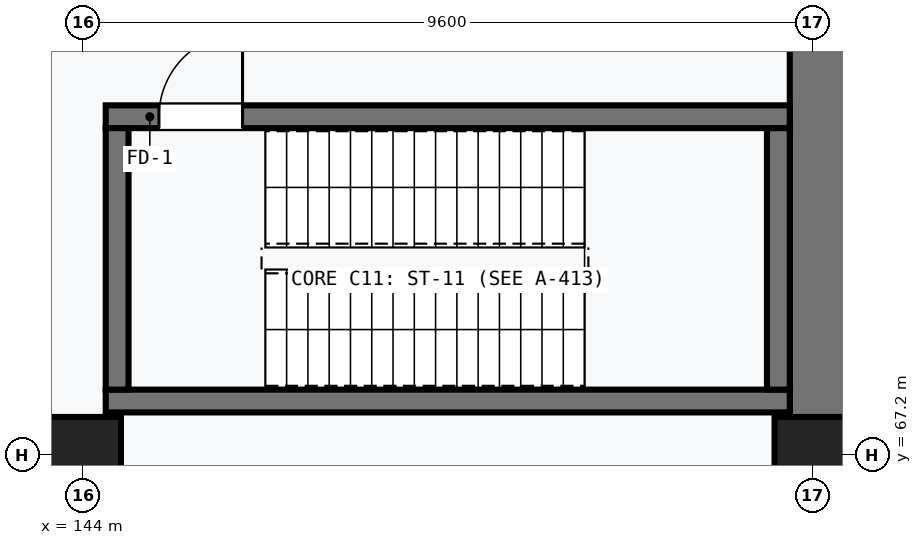
"""IFC4 building model, lengths in metres.
Left out: names, types, materials, properties, quantities, classifications, styles, units other than length and angle.
Written with IfcOpenShell. Run it as: python <this file> out.ifc"""

import sys

from ifc_helpers import new_model, si_unit, direction, frame, frame_2d, origin, origin_2d, place, context, subcontext, project, spatial, rectangle, extrude, element, fill, save


model = new_model("IFC4")
c1 = context("Model", 3, precision=1e-05, world=origin(), true_north=direction((0.0, 1.0)))
c2 = subcontext(c1, "Body", "Model", "MODEL_VIEW")
j1 = project(units=[si_unit("LENGTHUNIT", "METRE"), si_unit("PLANEANGLEUNIT", "RADIAN")], contexts=[c1])
p1 = place(None, origin())
s1 = spatial("IfcSite", under=j1, at=p1, CompositionType="ELEMENT")
p2 = place(p1, origin())
s2 = spatial("IfcBuilding", under=s1, at=p2, CompositionType="ELEMENT")
p3 = place(p2, frame((0.0, 0.0, -10.8)))
s3 = spatial("IfcBuildingStorey", under=s2, at=p3, CompositionType="ELEMENT", Elevation=-10.8)
p4 = place(p3, frame((153.7, 76.9, 0.0), z_axis=(0.0, 0.0, 1.0), x_axis=(0.0, -1.0, 0.0)))
e1 = element("IfcWall", 1, at=p4, inside=s3, PredefinedType="SOLIDWALL", context=c2, shape_type="SweptSolid", body=[
    extrude(rectangle(XDim=38.6, YDim=0.8, at=frame_2d((19.3, 0.0))), origin(), (0.0, 0.0, 1.0), 5.05),
])
for number, where, z_axis, x_axis in (
    (2, (144.0, 67.2, 0.0), (0.0, 0.0, 1.0), (1.0, 0.0, 0.0)),
    (3, (153.6, 67.2, 0.0), (0.0, 0.0, 1.0), (1.0, 0.0, 0.0)),
):
    element("IfcColumn", number, at=place(p3, frame(where, z_axis=z_axis, x_axis=x_axis)), inside=s3, PredefinedType="COLUMN", context=c2, shape_type="SweptSolid", body=[
        extrude(rectangle(XDim=1.0, YDim=1.0, at=origin_2d()), origin(), (0.0, 0.0, 1.0), 5.05),
    ])
p5 = place(p3, frame((144.3, 67.91, 0.0), z_axis=(0.0, 0.0, 1.0), x_axis=(1.0, 0.0, 0.0)))
e4 = element("IfcWall", 4, at=p5, inside=s3, PredefinedType="SHEAR", context=c2, shape_type="SweptSolid", body=[
    extrude(rectangle(XDim=9.0, YDim=0.3, at=frame_2d((4.5, 0.0))), origin(), (0.0, 0.0, 1.0), 5.05),
])
p6 = place(p3, frame((153.3, 71.65, 0.0), z_axis=(0.0, 0.0, 1.0), x_axis=(-1.0, 0.0, 0.0)))
e5 = element("IfcWall", 5, at=p6, inside=s3, PredefinedType="SHEAR", context=c2, shape_type="SweptSolid", body=[
    extrude(rectangle(XDim=9.0, YDim=0.3, at=frame_2d((4.5, 0.0))), origin(), (0.0, 0.0, 1.0), 5.05),
])
p7 = place(p6, frame((7.2, 0.0, 0.0)))
e6 = element("IfcOpeningElement", 6, at=p7, cuts=e5, PredefinedType="OPENING", context=c2, shape_type="SweptSolid", body=[
    extrude(rectangle(XDim=1.1, YDim=2.15, at=frame_2d((0.55, 1.075))), frame((0.0, 0.16, 0.0), z_axis=(0.0, -1.0, 0.0), x_axis=(1.0, 0.0, 0.0)), (0.0, 0.0, 1.0), 0.32),
])
for number, where, z_axis, x_axis in (
    (7, (144.45, 68.06, 0.0), (0.0, 0.0, 1.0), (0.0, 1.0, 0.0)),
    (8, (153.15, 71.5, 0.0), (0.0, 0.0, 1.0), (0.0, -1.0, 0.0)),
):
    element("IfcWall", number, at=place(p3, frame(where, z_axis=z_axis, x_axis=x_axis)), inside=s3, PredefinedType="SHEAR", context=c2, shape_type="SweptSolid", body=[
        extrude(rectangle(XDim=3.44, YDim=0.3, at=frame_2d((1.72, 0.0))), origin(), (0.0, 0.0, 1.0), 5.05),
    ])
p8 = place(p7, frame((1.1, 0.0, 0.0), z_axis=(0.0, 0.0, 1.0), x_axis=(-1.0, 0.0, 0.0)))
e9 = element("IfcDoor", 9, at=p8, inside=s3, OperationType="SINGLE_SWING_LEFT", PredefinedType="DOOR", context=c2, shape_type="SweptSolid", body=[
    extrude(rectangle(XDim=1.1, YDim=2.15, at=frame_2d((0.55, 1.075))), frame((0.0, 0.025, 0.0), z_axis=(0.0, -1.0, 0.0), x_axis=(1.0, 0.0, 0.0)), (0.0, 0.0, 1.0), 0.05),
])
fill(e6, e9)
save(model, sys.argv[1])
